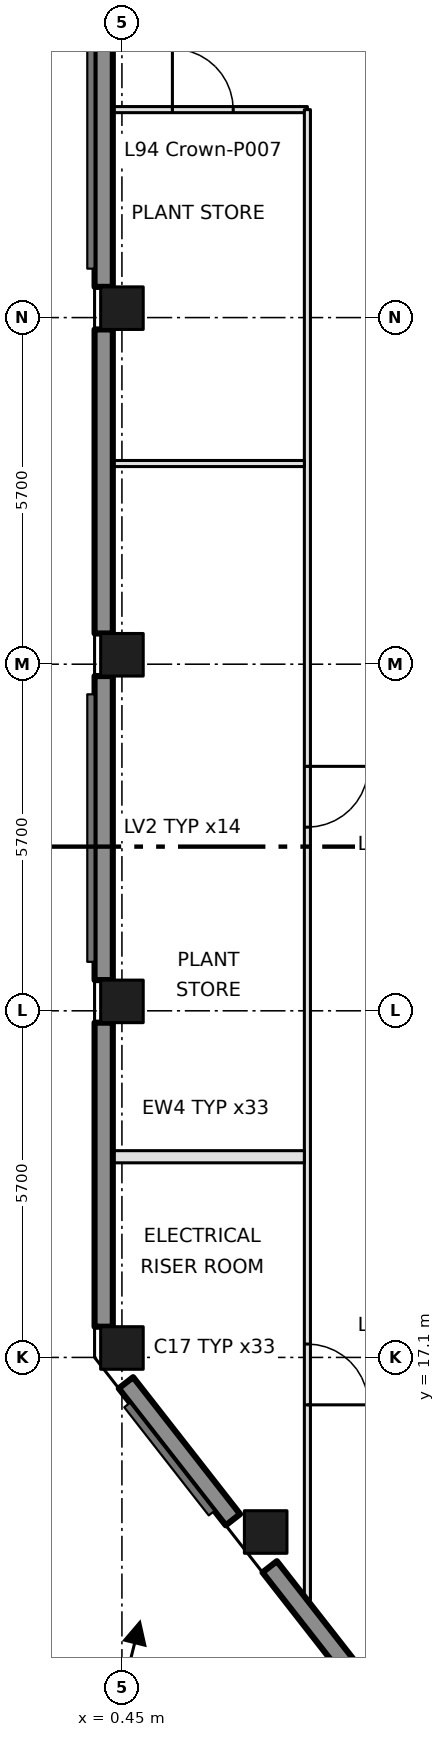
"""IFC4 building model, lengths in metres.
Left out: names, types, materials, properties, quantities, classifications, styles, units other than length and angle.
Written with IfcOpenShell. Run it as: python <this file> out.ifc"""

import sys

from ifc_helpers import new_model, si_unit, direction, frame, frame_2d, origin, origin_2d, place, context, subcontext, project, spatial, rectangle, extrude, element, fill, save


model = new_model("IFC4")
c1 = context("Model", 3, precision=1e-05, world=origin(), true_north=direction((0.0, 1.0)))
c2 = subcontext(c1, "Body", "Model", "MODEL_VIEW")
j1 = project(units=[si_unit("LENGTHUNIT", "METRE"), si_unit("PLANEANGLEUNIT", "RADIAN")], contexts=[c1])
p1 = place(None, origin())
s1 = spatial("IfcSite", under=j1, at=p1, CompositionType="ELEMENT")
p2 = place(p1, origin())
s2 = spatial("IfcBuilding", under=s1, at=p2, CompositionType="ELEMENT")
p3 = place(p2, frame((0.0, 0.0, 409.8)))
s3 = spatial("IfcBuildingStorey", under=s2, at=p3, CompositionType="ELEMENT", Elevation=409.8)
for number, where, z_axis, x_axis in (
    (1, (0.45, 17.255, 0.0), (0.0, 0.0, 1.0), (1.0, 0.0, 0.0)),
    (2, (0.45, 22.955, 0.0), (0.0, 0.0, 1.0), (1.0, 0.0, 0.0)),
    (3, (0.45, 28.655, 0.0), (0.0, 0.0, 1.0), (1.0, 0.0, 0.0)),
    (4, (0.45, 34.355, 0.0), (0.0, 0.0, 1.0), (1.0, 0.0, 0.0)),
    (5, (2.814, 14.229, 0.0), (0.0, 0.0, 1.0), (1.0, 0.0, 0.0)),
):
    element("IfcColumn", number, at=place(p3, frame(where, z_axis=z_axis, x_axis=x_axis)), inside=s3, PredefinedType="COLUMN", context=c2, shape_type="SweptSolid", body=[
        extrude(rectangle(XDim=0.7, YDim=0.7, at=origin_2d()), origin(), (0.0, 0.0, 1.0), 4.8),
    ])
p4 = place(p3, frame((0.3, 37.62, 0.0), z_axis=(0.0, 0.0, 1.0), x_axis=(1.0, 0.0, 0.0)))
e6 = element("IfcWall", 6, at=p4, inside=s3, PredefinedType="PARTITIONING", context=c2, shape_type="SweptSolid", body=[
    extrude(rectangle(XDim=3.2, YDim=0.1, at=frame_2d((1.6, 0.0))), origin(), (0.0, 0.0, 1.0), 4.5),
])
p5 = place(p4, frame((0.98, 0.0, 0.0)))
e7 = element("IfcOpeningElement", 7, at=p5, cuts=e6, PredefinedType="OPENING", context=c2, shape_type="SweptSolid", body=[
    extrude(rectangle(XDim=1.0, YDim=2.1, at=frame_2d((0.5, 1.05))), frame((0.0, 0.06, 0.0), z_axis=(0.0, -1.0, 0.0), x_axis=(1.0, 0.0, 0.0)), (0.0, 0.0, 1.0), 0.12),
])
p6 = place(p3, frame((3.5, 37.62, 0.0), z_axis=(0.0, 0.0, 1.0), x_axis=(0.0, -1.0, 0.0)))
e8 = element("IfcWall", 8, at=p6, inside=s3, PredefinedType="PARTITIONING", context=c2, shape_type="SweptSolid", body=[
    extrude(rectangle(XDim=24.513, YDim=0.1, at=frame_2d((12.257, 0.0))), origin(), (0.0, 0.0, 1.0), 4.5),
])
p7 = place(p6, frame((20.3, 0.0, 0.0)))
e9 = element("IfcOpeningElement", 9, at=p7, cuts=e8, PredefinedType="OPENING", context=c2, shape_type="SweptSolid", body=[
    extrude(rectangle(XDim=1.0, YDim=2.1, at=frame_2d((0.5, 1.05))), frame((0.0, 0.06, 0.0), z_axis=(0.0, -1.0, 0.0), x_axis=(1.0, 0.0, 0.0)), (0.0, 0.0, 1.0), 0.12),
])
p8 = place(p6, frame((10.8, 0.0, 0.0)))
e10 = element("IfcOpeningElement", 10, at=p8, cuts=e8, PredefinedType="OPENING", context=c2, shape_type="SweptSolid", body=[
    extrude(rectangle(XDim=1.0, YDim=2.1, at=frame_2d((0.5, 1.05))), frame((0.0, 0.06, 0.0), z_axis=(0.0, -1.0, 0.0), x_axis=(1.0, 0.0, 0.0)), (0.0, 0.0, 1.0), 0.12),
])
p9 = place(p3, frame((3.45, 20.4, 0.0), z_axis=(0.0, 0.0, 1.0), x_axis=(-1.0, 0.0, 0.0)))
e11 = element("IfcWall", 11, at=p9, inside=s3, PredefinedType="PARTITIONING", context=c2, shape_type="SweptSolid", body=[
    extrude(rectangle(XDim=3.15, YDim=0.2, at=frame_2d((1.575, 0.0))), origin(), (0.0, 0.0, 1.0), 4.5),
])
p10 = place(p3, frame((3.45, 31.8, 0.0), z_axis=(0.0, 0.0, 1.0), x_axis=(-1.0, 0.0, 0.0)))
e12 = element("IfcWall", 12, at=p10, inside=s3, PredefinedType="PARTITIONING", context=c2, shape_type="SweptSolid", body=[
    extrude(rectangle(XDim=3.15, YDim=0.1, at=frame_2d((1.575, 0.0))), origin(), (0.0, 0.0, 1.0), 4.5),
])
p11 = place(p3, frame((0.15, 39.364, 0.0), z_axis=(0.0, 0.0, 1.0), x_axis=(0.0, -1.0, 0.0)))
e13 = element("IfcWall", 13, at=p11, inside=s3, PredefinedType="SOLIDWALL", context=c2, shape_type="SweptSolid", body=[
    extrude(rectangle(XDim=4.659, YDim=0.3, at=frame_2d((2.33, 0.0))), origin(), (0.0, 0.0, 1.0), 3.85),
])
for number, where, z_axis, x_axis in (
    (14, (0.15, 34.005, 0.0), (0.0, 0.0, 1.0), (0.0, -1.0, 0.0)),
    (15, (0.15, 28.305, 0.0), (0.0, 0.0, 1.0), (0.0, -1.0, 0.0)),
    (16, (0.15, 22.605, 0.0), (0.0, 0.0, 1.0), (0.0, -1.0, 0.0)),
):
    element("IfcWall", number, at=place(p3, frame(where, z_axis=z_axis, x_axis=x_axis)), inside=s3, PredefinedType="SOLIDWALL", context=c2, shape_type="SweptSolid", body=[
        extrude(rectangle(XDim=5.0, YDim=0.3, at=frame_2d((2.5, 0.0))), origin(), (0.0, 0.0, 1.0), 3.85),
    ])
p12 = place(p3, frame((0.516, 16.683, 0.0), z_axis=(0.0, 0.0, 1.0), x_axis=(0.615483207854, -0.788149998953, 0.0)))
e17 = element("IfcWall", 17, at=p12, inside=s3, PredefinedType="SOLIDWALL", context=c2, shape_type="SweptSolid", body=[
    extrude(rectangle(XDim=2.858, YDim=0.3, at=frame_2d((1.429, 0.0))), origin(), (0.0, 0.0, 1.0), 3.85),
])
p13 = place(p3, frame((2.88, 13.657, 0.0), z_axis=(0.0, 0.0, 1.0), x_axis=(0.61578764214, -0.787912165021, 0.0)))
e18 = element("IfcWall", 18, at=p13, inside=s3, PredefinedType="SOLIDWALL", context=c2, shape_type="SweptSolid", body=[
    extrude(rectangle(XDim=4.718, YDim=0.3, at=frame_2d((2.359, 0.0))), origin(), (0.0, 0.0, 1.0), 3.85),
])
p14 = place(p7, origin())
e19 = element("IfcDoor", 19, at=p14, inside=s3, OperationType="SINGLE_SWING_RIGHT", PredefinedType="DOOR", context=c2, shape_type="SweptSolid", body=[
    extrude(rectangle(XDim=1.0, YDim=2.1, at=frame_2d((0.5, 1.05))), frame((0.0, 0.025, 0.0), z_axis=(0.0, -1.0, 0.0), x_axis=(1.0, 0.0, 0.0)), (0.0, 0.0, 1.0), 0.05),
])
fill(e9, e19)
p15 = place(p8, origin())
e20 = element("IfcDoor", 20, at=p15, inside=s3, OperationType="SINGLE_SWING_LEFT", PredefinedType="DOOR", context=c2, shape_type="SweptSolid", body=[
    extrude(rectangle(XDim=1.0, YDim=2.1, at=frame_2d((0.5, 1.05))), frame((0.0, 0.025, 0.0), z_axis=(0.0, -1.0, 0.0), x_axis=(1.0, 0.0, 0.0)), (0.0, 0.0, 1.0), 0.05),
])
fill(e10, e20)
p16 = place(p5, origin())
e21 = element("IfcDoor", 21, at=p16, inside=s3, OperationType="SINGLE_SWING_LEFT", PredefinedType="DOOR", context=c2, shape_type="SweptSolid", body=[
    extrude(rectangle(XDim=1.0, YDim=2.1, at=frame_2d((0.5, 1.05))), frame((0.0, 0.025, 0.0), z_axis=(0.0, -1.0, 0.0), x_axis=(1.0, 0.0, 0.0)), (0.0, 0.0, 1.0), 0.05),
])
fill(e7, e21)
save(model, sys.argv[1])
